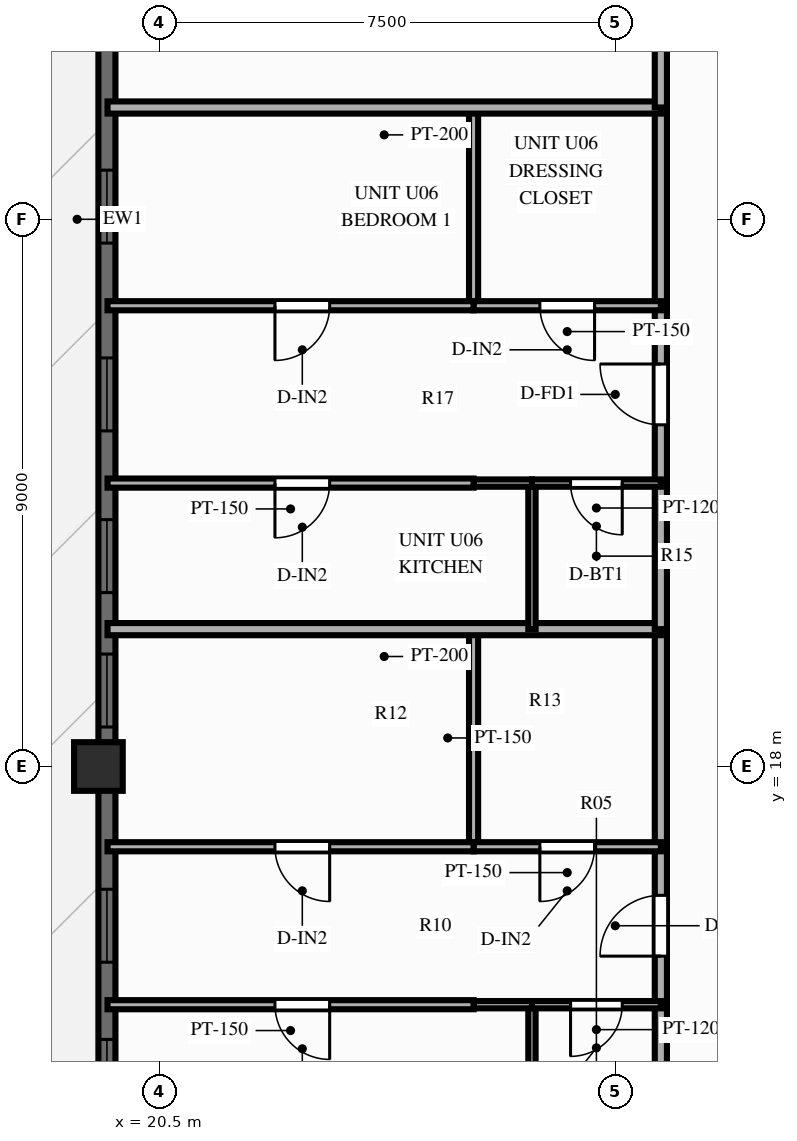
"""IFC4 building model, lengths in metres.
Left out: names, types, materials, properties, quantities, classifications, styles, units other than length and angle.
Written with IfcOpenShell. Run it as: python <this file> out.ifc"""

import sys

from ifc_helpers import new_model, si_unit, direction, frame, frame_2d, origin, origin_2d, place, context, subcontext, project, spatial, rectangle, extrude, source, transform, mapped, element, fill, save


model = new_model("IFC4")
c1 = context("Model", 3, precision=1e-05, world=origin(), true_north=direction((0.0, 1.0)))
c2 = subcontext(c1, "Body", "Model", "MODEL_VIEW")
j1 = project(units=[si_unit("LENGTHUNIT", "METRE"), si_unit("PLANEANGLEUNIT", "RADIAN")], contexts=[c1])
p1 = place(None, origin())
s1 = spatial("IfcSite", under=j1, at=p1, CompositionType="ELEMENT")
p2 = place(p1, origin())
s2 = spatial("IfcBuilding", under=s1, at=p2, CompositionType="ELEMENT")
p3 = place(p2, frame((0.0, 0.0, 199.6)))
s3 = spatial("IfcBuildingStorey", under=s2, at=p3, CompositionType="ELEMENT", Elevation=199.6)
m1 = source(origin(), c2, "Body", "SweptSolid", [
    extrude(rectangle(XDim=0.8, YDim=0.8, at=origin_2d()), origin(), (0.0, 0.0, 1.0), 3.0),
])
p4 = place(p3, frame((19.5, 18.0, 0.0), z_axis=(0.0, 0.0, 1.0), x_axis=(1.0, 0.0, 0.0)))
e1 = element("IfcColumn", 1, at=p4, inside=s3, PredefinedType="COLUMN", context=c2, shape_type="MappedRepresentation", body=[
    mapped(m1, transform((0.0, 0.0, 0.0), scale=1.0)),
])
p5 = place(p3, frame((19.64, 11.5, 0.0), z_axis=(0.0, 0.0, 1.0), x_axis=(0.0, 1.0, 0.0)))
e2 = element("IfcWall", 2, at=p5, inside=s3, PredefinedType="SOLIDWALL", context=c2, shape_type="SweptSolid", body=[
    extrude(rectangle(XDim=31.0, YDim=0.28, at=frame_2d((15.5, 0.0))), origin(), (0.0, 0.0, 1.0), 2.28),
])
p6 = place(p5, frame((0.811, 0.0, 0.25)))
e3 = element("IfcOpeningElement", 3, at=p6, cuts=e2, PredefinedType="OPENING", context=c2, shape_type="SweptSolid", body=[
    extrude(rectangle(XDim=1.2, YDim=1.5, at=frame_2d((0.6, 0.75))), frame((0.0, 0.152, 0.0), z_axis=(0.0, -1.0, 0.0), x_axis=(1.0, 0.0, 0.0)), (0.0, 0.0, 1.0), 0.304),
])
p7 = place(p5, frame((3.281, 0.0, 0.25)))
e4 = element("IfcOpeningElement", 4, at=p7, cuts=e2, PredefinedType="OPENING", context=c2, shape_type="SweptSolid", body=[
    extrude(rectangle(XDim=1.2, YDim=1.5, at=frame_2d((0.6, 0.75))), frame((0.0, 0.152, 0.0), z_axis=(0.0, -1.0, 0.0), x_axis=(1.0, 0.0, 0.0)), (0.0, 0.0, 1.0), 0.304),
])
p8 = place(p5, frame((7.15, 0.0, 0.25)))
e5 = element("IfcOpeningElement", 5, at=p8, cuts=e2, PredefinedType="OPENING", context=c2, shape_type="SweptSolid", body=[
    extrude(rectangle(XDim=1.2, YDim=1.5, at=frame_2d((0.6, 0.75))), frame((0.0, 0.152, 0.0), z_axis=(0.0, -1.0, 0.0), x_axis=(1.0, 0.0, 0.0)), (0.0, 0.0, 1.0), 0.304),
])
p9 = place(p5, frame((9.36, 0.0, 0.25)))
e6 = element("IfcOpeningElement", 6, at=p9, cuts=e2, PredefinedType="OPENING", context=c2, shape_type="SweptSolid", body=[
    extrude(rectangle(XDim=1.2, YDim=1.5, at=frame_2d((0.6, 0.75))), frame((0.0, 0.152, 0.0), z_axis=(0.0, -1.0, 0.0), x_axis=(1.0, 0.0, 0.0)), (0.0, 0.0, 1.0), 0.304),
])
p10 = place(p5, frame((12.02, 0.0, 0.25)))
e7 = element("IfcOpeningElement", 7, at=p10, cuts=e2, PredefinedType="OPENING", context=c2, shape_type="SweptSolid", body=[
    extrude(rectangle(XDim=1.2, YDim=1.5, at=frame_2d((0.6, 0.75))), frame((0.0, 0.152, 0.0), z_axis=(0.0, -1.0, 0.0), x_axis=(1.0, 0.0, 0.0)), (0.0, 0.0, 1.0), 0.304),
])
p11 = place(p5, frame((15.108, 0.0, 0.25)))
e8 = element("IfcOpeningElement", 8, at=p11, cuts=e2, PredefinedType="OPENING", context=c2, shape_type="SweptSolid", body=[
    extrude(rectangle(XDim=1.2, YDim=1.5, at=frame_2d((0.6, 0.75))), frame((0.0, 0.152, 0.0), z_axis=(0.0, -1.0, 0.0), x_axis=(1.0, 0.0, 0.0)), (0.0, 0.0, 1.0), 0.304),
])
p12 = place(p5, frame((18.484, 0.0, 0.0)))
e9 = element("IfcOpeningElement", 9, at=p12, cuts=e2, PredefinedType="OPENING", context=c2, shape_type="SweptSolid", body=[
    extrude(rectangle(XDim=1.6, YDim=2.15, at=frame_2d((0.8, 1.075))), frame((0.0, 0.152, 0.0), z_axis=(0.0, -1.0, 0.0), x_axis=(1.0, 0.0, 0.0)), (0.0, 0.0, 1.0), 0.304),
])
p13 = place(p5, frame((22.054, 0.0, 0.25)))
e10 = element("IfcOpeningElement", 10, at=p13, cuts=e2, PredefinedType="OPENING", context=c2, shape_type="SweptSolid", body=[
    extrude(rectangle(XDim=1.2, YDim=1.5, at=frame_2d((0.6, 0.75))), frame((0.0, 0.152, 0.0), z_axis=(0.0, -1.0, 0.0), x_axis=(1.0, 0.0, 0.0)), (0.0, 0.0, 1.0), 0.304),
])
p14 = place(p5, frame((25.235, 0.0, 0.25)))
e11 = element("IfcOpeningElement", 11, at=p14, cuts=e2, PredefinedType="OPENING", context=c2, shape_type="SweptSolid", body=[
    extrude(rectangle(XDim=1.2, YDim=1.5, at=frame_2d((0.6, 0.75))), frame((0.0, 0.152, 0.0), z_axis=(0.0, -1.0, 0.0), x_axis=(1.0, 0.0, 0.0)), (0.0, 0.0, 1.0), 0.304),
])
p15 = place(p5, frame((28.245, 0.0, 0.25)))
e12 = element("IfcOpeningElement", 12, at=p15, cuts=e2, PredefinedType="OPENING", context=c2, shape_type="SweptSolid", body=[
    extrude(rectangle(XDim=1.2, YDim=1.5, at=frame_2d((0.6, 0.75))), frame((0.0, 0.152, 0.0), z_axis=(0.0, -1.0, 0.0), x_axis=(1.0, 0.0, 0.0)), (0.0, 0.0, 1.0), 0.304),
])
p16 = place(p3, frame((28.75, 11.68, 0.0), z_axis=(0.0, 0.0, 1.0), x_axis=(0.0, 1.0, 0.0)))
e13 = element("IfcWall", 13, at=p16, inside=s3, PredefinedType="PARTITIONING", context=c2, shape_type="SweptSolid", body=[
    extrude(rectangle(XDim=2.402, YDim=0.2, at=frame_2d((1.201, 0.0))), origin(), (0.0, 0.0, 1.0), 2.79),
])
p17 = place(p3, frame((28.75, 14.082, 0.0), z_axis=(0.0, 0.0, 1.0), x_axis=(0.0, 1.0, 0.0)))
e14 = element("IfcWall", 14, at=p17, inside=s3, PredefinedType="PARTITIONING", context=c2, shape_type="SweptSolid", body=[
    extrude(rectangle(XDim=2.598, YDim=0.2, at=frame_2d((1.299, 0.0))), origin(), (0.0, 0.0, 1.0), 2.79),
])
p18 = place(p17, frame((0.799, 0.0, 0.0)))
e15 = element("IfcOpeningElement", 15, at=p18, cuts=e14, PredefinedType="OPENING", context=c2, shape_type="SweptSolid", body=[
    extrude(rectangle(XDim=1.0, YDim=2.15, at=frame_2d((0.5, 1.075))), frame((0.0, 0.112, 0.0), z_axis=(0.0, -1.0, 0.0), x_axis=(1.0, 0.0, 0.0)), (0.0, 0.0, 1.0), 0.224),
])
p19 = place(p3, frame((28.75, 16.68, 0.0), z_axis=(0.0, 0.0, 1.0), x_axis=(0.0, 1.0, 0.0)))
e16 = element("IfcWall", 16, at=p19, inside=s3, PredefinedType="PARTITIONING", context=c2, shape_type="SweptSolid", body=[
    extrude(rectangle(XDim=3.579, YDim=0.2, at=frame_2d((1.79, 0.0))), origin(), (0.0, 0.0, 1.0), 2.79),
])
p20 = place(p3, frame((26.63, 11.68, 0.0), z_axis=(0.0, 0.0, 1.0), x_axis=(0.0, 1.0, 0.0)))
e17 = element("IfcWall", 17, at=p20, inside=s3, PredefinedType="PARTITIONING", context=c2, shape_type="SweptSolid", body=[
    extrude(rectangle(XDim=2.402, YDim=0.12, at=frame_2d((1.201, 0.0))), origin(), (0.0, 0.0, 1.0), 2.79),
])
p21 = place(p3, frame((25.67, 16.68, 0.0), z_axis=(0.0, 0.0, 1.0), x_axis=(0.0, 1.0, 0.0)))
e18 = element("IfcWall", 18, at=p21, inside=s3, PredefinedType="PARTITIONING", context=c2, shape_type="SweptSolid", body=[
    extrude(rectangle(XDim=3.579, YDim=0.15, at=frame_2d((1.79, 0.0))), origin(), (0.0, 0.0, 1.0), 2.49),
])
p22 = place(p3, frame((28.75, 14.082, 0.0), z_axis=(0.0, 0.0, 1.0), x_axis=(-1.0, 0.0, 0.0)))
e19 = element("IfcWall", 19, at=p22, inside=s3, PredefinedType="PARTITIONING", context=c2, shape_type="SweptSolid", body=[
    extrude(rectangle(XDim=2.12, YDim=0.12, at=frame_2d((1.06, 0.0))), origin(), (0.0, 0.0, 1.0), 2.79),
])
p23 = place(p22, frame((0.635, 0.0, 0.0)))
e20 = element("IfcOpeningElement", 20, at=p23, cuts=e19, PredefinedType="OPENING", context=c2, shape_type="SweptSolid", body=[
    extrude(rectangle(XDim=0.85, YDim=2.05, at=frame_2d((0.425, 1.025))), frame((0.0, 0.072, 0.0), z_axis=(0.0, -1.0, 0.0), x_axis=(1.0, 0.0, 0.0)), (0.0, 0.0, 1.0), 0.144),
])
p24 = place(p3, frame((26.63, 14.082, 0.0), z_axis=(0.0, 0.0, 1.0), x_axis=(-1.0, 0.0, 0.0)))
e21 = element("IfcWall", 21, at=p24, inside=s3, PredefinedType="PARTITIONING", context=c2, shape_type="SweptSolid", body=[
    extrude(rectangle(XDim=0.96, YDim=0.12, at=frame_2d((0.48, 0.0))), origin(), (0.0, 0.0, 1.0), 2.79),
])
p25 = place(p3, frame((25.67, 14.082, 0.0), z_axis=(0.0, 0.0, 1.0), x_axis=(-1.0, 0.0, 0.0)))
e22 = element("IfcWall", 22, at=p25, inside=s3, PredefinedType="PARTITIONING", context=c2, shape_type="SweptSolid", body=[
    extrude(rectangle(XDim=6.02, YDim=0.15, at=frame_2d((3.01, 0.0))), origin(), (0.0, 0.0, 1.0), 2.79),
])
p26 = place(p25, frame((2.367, 0.0, 0.0)))
e23 = element("IfcOpeningElement", 23, at=p26, cuts=e22, PredefinedType="OPENING", context=c2, shape_type="SweptSolid", body=[
    extrude(rectangle(XDim=0.9, YDim=2.1, at=frame_2d((0.45, 1.05))), frame((0.0, 0.087, 0.0), z_axis=(0.0, -1.0, 0.0), x_axis=(1.0, 0.0, 0.0)), (0.0, 0.0, 1.0), 0.174),
])
p27 = place(p3, frame((28.75, 16.68, 0.0), z_axis=(0.0, 0.0, 1.0), x_axis=(-1.0, 0.0, 0.0)))
e24 = element("IfcWall", 24, at=p27, inside=s3, PredefinedType="PARTITIONING", context=c2, shape_type="SweptSolid", body=[
    extrude(rectangle(XDim=3.08, YDim=0.15, at=frame_2d((1.54, 0.0))), origin(), (0.0, 0.0, 1.0), 2.79),
])
p28 = place(p27, frame((1.09, 0.0, 0.0)))
e25 = element("IfcOpeningElement", 25, at=p28, cuts=e24, PredefinedType="OPENING", context=c2, shape_type="SweptSolid", body=[
    extrude(rectangle(XDim=0.9, YDim=2.1, at=frame_2d((0.45, 1.05))), frame((0.0, 0.087, 0.0), z_axis=(0.0, -1.0, 0.0), x_axis=(1.0, 0.0, 0.0)), (0.0, 0.0, 1.0), 0.174),
])
p29 = place(p3, frame((25.67, 16.68, 0.0), z_axis=(0.0, 0.0, 1.0), x_axis=(-1.0, 0.0, 0.0)))
e26 = element("IfcWall", 26, at=p29, inside=s3, PredefinedType="PARTITIONING", context=c2, shape_type="SweptSolid", body=[
    extrude(rectangle(XDim=6.02, YDim=0.15, at=frame_2d((3.01, 0.0))), origin(), (0.0, 0.0, 1.0), 2.79),
])
p30 = place(p29, frame((2.367, 0.0, 0.0)))
e27 = element("IfcOpeningElement", 27, at=p30, cuts=e26, PredefinedType="OPENING", context=c2, shape_type="SweptSolid", body=[
    extrude(rectangle(XDim=0.9, YDim=2.1, at=frame_2d((0.45, 1.05))), frame((0.0, 0.087, 0.0), z_axis=(0.0, -1.0, 0.0), x_axis=(1.0, 0.0, 0.0)), (0.0, 0.0, 1.0), 0.174),
])
p31 = place(p3, frame((28.75, 20.259, 0.0), z_axis=(0.0, 0.0, 1.0), x_axis=(-1.0, 0.0, 0.0)))
e28 = element("IfcWall", 28, at=p31, inside=s3, PredefinedType="PARTITIONING", context=c2, shape_type="SweptSolid", body=[
    extrude(rectangle(XDim=9.1, YDim=0.2, at=frame_2d((4.55, 0.0))), origin(), (0.0, 0.0, 1.0), 2.79),
])
p32 = place(p3, frame((28.75, 20.259, 0.0), z_axis=(0.0, 0.0, 1.0), x_axis=(0.0, 1.0, 0.0)))
e29 = element("IfcWall", 29, at=p32, inside=s3, PredefinedType="PARTITIONING", context=c2, shape_type="SweptSolid", body=[
    extrude(rectangle(XDim=2.402, YDim=0.2, at=frame_2d((1.201, 0.0))), origin(), (0.0, 0.0, 1.0), 2.79),
])
p33 = place(p3, frame((28.75, 22.661, 0.0), z_axis=(0.0, 0.0, 1.0), x_axis=(0.0, 1.0, 0.0)))
e30 = element("IfcWall", 30, at=p33, inside=s3, PredefinedType="PARTITIONING", context=c2, shape_type="SweptSolid", body=[
    extrude(rectangle(XDim=2.917, YDim=0.2, at=frame_2d((1.458, 0.0))), origin(), (0.0, 0.0, 1.0), 2.79),
])
p34 = place(p33, frame((0.958, 0.0, 0.0)))
e31 = element("IfcOpeningElement", 31, at=p34, cuts=e30, PredefinedType="OPENING", context=c2, shape_type="SweptSolid", body=[
    extrude(rectangle(XDim=1.0, YDim=2.15, at=frame_2d((0.5, 1.075))), frame((0.0, 0.112, 0.0), z_axis=(0.0, -1.0, 0.0), x_axis=(1.0, 0.0, 0.0)), (0.0, 0.0, 1.0), 0.224),
])
p35 = place(p3, frame((28.75, 25.578, 0.0), z_axis=(0.0, 0.0, 1.0), x_axis=(0.0, 1.0, 0.0)))
e32 = element("IfcWall", 32, at=p35, inside=s3, PredefinedType="PARTITIONING", context=c2, shape_type="SweptSolid", body=[
    extrude(rectangle(XDim=3.26, YDim=0.2, at=frame_2d((1.63, 0.0))), origin(), (0.0, 0.0, 1.0), 2.79),
])
p36 = place(p3, frame((26.63, 20.259, 0.0), z_axis=(0.0, 0.0, 1.0), x_axis=(0.0, 1.0, 0.0)))
e33 = element("IfcWall", 33, at=p36, inside=s3, PredefinedType="PARTITIONING", context=c2, shape_type="SweptSolid", body=[
    extrude(rectangle(XDim=2.402, YDim=0.12, at=frame_2d((1.201, 0.0))), origin(), (0.0, 0.0, 1.0), 2.79),
])
p37 = place(p3, frame((25.67, 25.578, 0.0), z_axis=(0.0, 0.0, 1.0), x_axis=(0.0, 1.0, 0.0)))
e34 = element("IfcWall", 34, at=p37, inside=s3, PredefinedType="PARTITIONING", context=c2, shape_type="SweptSolid", body=[
    extrude(rectangle(XDim=3.26, YDim=0.15, at=frame_2d((1.63, 0.0))), origin(), (0.0, 0.0, 1.0), 2.49),
])
p38 = place(p3, frame((28.75, 22.661, 0.0), z_axis=(0.0, 0.0, 1.0), x_axis=(-1.0, 0.0, 0.0)))
e35 = element("IfcWall", 35, at=p38, inside=s3, PredefinedType="PARTITIONING", context=c2, shape_type="SweptSolid", body=[
    extrude(rectangle(XDim=2.12, YDim=0.12, at=frame_2d((1.06, 0.0))), origin(), (0.0, 0.0, 1.0), 2.79),
])
p39 = place(p38, frame((0.635, 0.0, 0.0)))
e36 = element("IfcOpeningElement", 36, at=p39, cuts=e35, PredefinedType="OPENING", context=c2, shape_type="SweptSolid", body=[
    extrude(rectangle(XDim=0.85, YDim=2.05, at=frame_2d((0.425, 1.025))), frame((0.0, 0.072, 0.0), z_axis=(0.0, -1.0, 0.0), x_axis=(1.0, 0.0, 0.0)), (0.0, 0.0, 1.0), 0.144),
])
p40 = place(p3, frame((26.63, 22.661, 0.0), z_axis=(0.0, 0.0, 1.0), x_axis=(-1.0, 0.0, 0.0)))
e37 = element("IfcWall", 37, at=p40, inside=s3, PredefinedType="PARTITIONING", context=c2, shape_type="SweptSolid", body=[
    extrude(rectangle(XDim=0.96, YDim=0.12, at=frame_2d((0.48, 0.0))), origin(), (0.0, 0.0, 1.0), 2.79),
])
p41 = place(p3, frame((25.67, 22.661, 0.0), z_axis=(0.0, 0.0, 1.0), x_axis=(-1.0, 0.0, 0.0)))
e38 = element("IfcWall", 38, at=p41, inside=s3, PredefinedType="PARTITIONING", context=c2, shape_type="SweptSolid", body=[
    extrude(rectangle(XDim=6.02, YDim=0.15, at=frame_2d((3.01, 0.0))), origin(), (0.0, 0.0, 1.0), 2.79),
])
p42 = place(p41, frame((2.367, 0.0, 0.0)))
e39 = element("IfcOpeningElement", 39, at=p42, cuts=e38, PredefinedType="OPENING", context=c2, shape_type="SweptSolid", body=[
    extrude(rectangle(XDim=0.9, YDim=2.1, at=frame_2d((0.45, 1.05))), frame((0.0, 0.087, 0.0), z_axis=(0.0, -1.0, 0.0), x_axis=(1.0, 0.0, 0.0)), (0.0, 0.0, 1.0), 0.174),
])
p43 = place(p3, frame((28.75, 25.578, 0.0), z_axis=(0.0, 0.0, 1.0), x_axis=(-1.0, 0.0, 0.0)))
e40 = element("IfcWall", 40, at=p43, inside=s3, PredefinedType="PARTITIONING", context=c2, shape_type="SweptSolid", body=[
    extrude(rectangle(XDim=3.08, YDim=0.15, at=frame_2d((1.54, 0.0))), origin(), (0.0, 0.0, 1.0), 2.79),
])
p44 = place(p43, frame((1.09, 0.0, 0.0)))
e41 = element("IfcOpeningElement", 41, at=p44, cuts=e40, PredefinedType="OPENING", context=c2, shape_type="SweptSolid", body=[
    extrude(rectangle(XDim=0.9, YDim=2.1, at=frame_2d((0.45, 1.05))), frame((0.0, 0.087, 0.0), z_axis=(0.0, -1.0, 0.0), x_axis=(1.0, 0.0, 0.0)), (0.0, 0.0, 1.0), 0.174),
])
p45 = place(p3, frame((25.67, 25.578, 0.0), z_axis=(0.0, 0.0, 1.0), x_axis=(-1.0, 0.0, 0.0)))
e42 = element("IfcWall", 42, at=p45, inside=s3, PredefinedType="PARTITIONING", context=c2, shape_type="SweptSolid", body=[
    extrude(rectangle(XDim=6.02, YDim=0.15, at=frame_2d((3.01, 0.0))), origin(), (0.0, 0.0, 1.0), 2.79),
])
p46 = place(p45, frame((2.367, 0.0, 0.0)))
e43 = element("IfcOpeningElement", 43, at=p46, cuts=e42, PredefinedType="OPENING", context=c2, shape_type="SweptSolid", body=[
    extrude(rectangle(XDim=0.9, YDim=2.1, at=frame_2d((0.45, 1.05))), frame((0.0, 0.087, 0.0), z_axis=(0.0, -1.0, 0.0), x_axis=(1.0, 0.0, 0.0)), (0.0, 0.0, 1.0), 0.174),
])
p47 = place(p3, frame((28.75, 28.838, 0.0), z_axis=(0.0, 0.0, 1.0), x_axis=(-1.0, 0.0, 0.0)))
e44 = element("IfcWall", 44, at=p47, inside=s3, PredefinedType="PARTITIONING", context=c2, shape_type="SweptSolid", body=[
    extrude(rectangle(XDim=9.1, YDim=0.2, at=frame_2d((4.55, 0.0))), origin(), (0.0, 0.0, 1.0), 2.79),
])
p48 = place(p3, frame((28.75, 28.838, 0.0), z_axis=(0.0, 0.0, 1.0), x_axis=(0.0, 1.0, 0.0)))
e45 = element("IfcWall", 45, at=p48, inside=s3, PredefinedType="PARTITIONING", context=c2, shape_type="SweptSolid", body=[
    extrude(rectangle(XDim=3.891, YDim=0.2, at=frame_2d((1.945, 0.0))), origin(), (0.0, 0.0, 1.0), 2.79),
])
p49 = place(p48, frame((1.445, 0.0, 0.0)))
e46 = element("IfcOpeningElement", 46, at=p49, cuts=e45, PredefinedType="OPENING", context=c2, shape_type="SweptSolid", body=[
    extrude(rectangle(XDim=1.0, YDim=2.15, at=frame_2d((0.5, 1.075))), frame((0.0, 0.112, 0.0), z_axis=(0.0, -1.0, 0.0), x_axis=(1.0, 0.0, 0.0)), (0.0, 0.0, 1.0), 0.224),
])
m2 = source(origin(), c2, "Body", "SweptSolid", [
    extrude(rectangle(XDim=1.2, YDim=1.5, at=frame_2d((0.6, 0.75))), frame((0.0, 0.03, 0.0), z_axis=(0.0, -1.0, 0.0), x_axis=(1.0, 0.0, 0.0)), (0.0, 0.0, 1.0), 0.06),
])
p50 = place(p6, origin())
e47 = element("IfcWindow", 47, at=p50, inside=s3, PartitioningType="SINGLE_PANEL", PredefinedType="WINDOW", context=c2, shape_type="MappedRepresentation", body=[
    mapped(m2, transform((0.0, 0.0, 0.0), scale=1.0)),
])
fill(e3, e47)
p51 = place(p7, origin())
e48 = element("IfcWindow", 48, at=p51, inside=s3, PartitioningType="SINGLE_PANEL", PredefinedType="WINDOW", context=c2, shape_type="MappedRepresentation", body=[
    mapped(m2, transform((0.0, 0.0, 0.0), scale=1.0)),
])
fill(e4, e48)
p52 = place(p8, origin())
e49 = element("IfcWindow", 49, at=p52, inside=s3, PartitioningType="SINGLE_PANEL", PredefinedType="WINDOW", context=c2, shape_type="MappedRepresentation", body=[
    mapped(m2, transform((0.0, 0.0, 0.0), scale=1.0)),
])
fill(e5, e49)
p53 = place(p9, origin())
e50 = element("IfcWindow", 50, at=p53, inside=s3, PartitioningType="SINGLE_PANEL", PredefinedType="WINDOW", context=c2, shape_type="MappedRepresentation", body=[
    mapped(m2, transform((0.0, 0.0, 0.0), scale=1.0)),
])
fill(e6, e50)
p54 = place(p10, origin())
e51 = element("IfcWindow", 51, at=p54, inside=s3, PartitioningType="SINGLE_PANEL", PredefinedType="WINDOW", context=c2, shape_type="MappedRepresentation", body=[
    mapped(m2, transform((0.0, 0.0, 0.0), scale=1.0)),
])
fill(e7, e51)
p55 = place(p11, origin())
e52 = element("IfcWindow", 52, at=p55, inside=s3, PartitioningType="SINGLE_PANEL", PredefinedType="WINDOW", context=c2, shape_type="MappedRepresentation", body=[
    mapped(m2, transform((0.0, 0.0, 0.0), scale=1.0)),
])
fill(e8, e52)
m3 = source(origin(), c2, "Body", "SweptSolid", [
    extrude(rectangle(XDim=1.0, YDim=2.15, at=frame_2d((0.5, 1.075))), frame((0.0, 0.025, 0.0), z_axis=(0.0, -1.0, 0.0), x_axis=(1.0, 0.0, 0.0)), (0.0, 0.0, 1.0), 0.05),
])
p56 = place(p18, origin())
e53 = element("IfcDoor", 53, at=p56, inside=s3, OperationType="SINGLE_SWING_LEFT", PredefinedType="DOOR", context=c2, shape_type="MappedRepresentation", body=[
    mapped(m3, transform((0.0, 0.0, 0.0), scale=1.0)),
])
fill(e15, e53)
m4 = source(origin(), c2, "Body", "SweptSolid", [
    extrude(rectangle(XDim=0.85, YDim=2.05, at=frame_2d((0.425, 1.025))), frame((0.0, 0.025, 0.0), z_axis=(0.0, -1.0, 0.0), x_axis=(1.0, 0.0, 0.0)), (0.0, 0.0, 1.0), 0.05),
])
p57 = place(p23, origin())
e54 = element("IfcDoor", 54, at=p57, inside=s3, OperationType="SINGLE_SWING_RIGHT", PredefinedType="DOOR", context=c2, shape_type="MappedRepresentation", body=[
    mapped(m4, transform((0.0, 0.0, 0.0), scale=1.0)),
])
fill(e20, e54)
m5 = source(origin(), c2, "Body", "SweptSolid", [
    extrude(rectangle(XDim=0.9, YDim=2.1, at=frame_2d((0.45, 1.05))), frame((0.0, 0.025, 0.0), z_axis=(0.0, -1.0, 0.0), x_axis=(1.0, 0.0, 0.0)), (0.0, 0.0, 1.0), 0.05),
])
p58 = place(p26, origin())
e55 = element("IfcDoor", 55, at=p58, inside=s3, OperationType="SINGLE_SWING_LEFT", PredefinedType="DOOR", context=c2, shape_type="MappedRepresentation", body=[
    mapped(m5, transform((0.0, 0.0, 0.0), scale=1.0)),
])
fill(e23, e55)
p59 = place(p28, origin())
e56 = element("IfcDoor", 56, at=p59, inside=s3, OperationType="SINGLE_SWING_RIGHT", PredefinedType="DOOR", context=c2, shape_type="MappedRepresentation", body=[
    mapped(m5, transform((0.0, 0.0, 0.0), scale=1.0)),
])
fill(e25, e56)
p60 = place(p30, origin())
e57 = element("IfcDoor", 57, at=p60, inside=s3, OperationType="SINGLE_SWING_LEFT", PredefinedType="DOOR", context=c2, shape_type="MappedRepresentation", body=[
    mapped(m5, transform((0.0, 0.0, 0.0), scale=1.0)),
])
fill(e27, e57)
p61 = place(p34, origin())
e58 = element("IfcDoor", 58, at=p61, inside=s3, OperationType="SINGLE_SWING_RIGHT", PredefinedType="DOOR", context=c2, shape_type="MappedRepresentation", body=[
    mapped(m3, transform((0.0, 0.0, 0.0), scale=1.0)),
])
fill(e31, e58)
p62 = place(p39, origin())
e59 = element("IfcDoor", 59, at=p62, inside=s3, OperationType="SINGLE_SWING_LEFT", PredefinedType="DOOR", context=c2, shape_type="MappedRepresentation", body=[
    mapped(m4, transform((0.0, 0.0, 0.0), scale=1.0)),
])
fill(e36, e59)
p63 = place(p42, origin())
e60 = element("IfcDoor", 60, at=p63, inside=s3, OperationType="SINGLE_SWING_RIGHT", PredefinedType="DOOR", context=c2, shape_type="MappedRepresentation", body=[
    mapped(m5, transform((0.0, 0.0, 0.0), scale=1.0)),
])
fill(e39, e60)
p64 = place(p44, origin())
e61 = element("IfcDoor", 61, at=p64, inside=s3, OperationType="SINGLE_SWING_LEFT", PredefinedType="DOOR", context=c2, shape_type="MappedRepresentation", body=[
    mapped(m5, transform((0.0, 0.0, 0.0), scale=1.0)),
])
fill(e41, e61)
p65 = place(p46, origin())
e62 = element("IfcDoor", 62, at=p65, inside=s3, OperationType="SINGLE_SWING_RIGHT", PredefinedType="DOOR", context=c2, shape_type="MappedRepresentation", body=[
    mapped(m5, transform((0.0, 0.0, 0.0), scale=1.0)),
])
fill(e43, e62)
save(model, sys.argv[1])
